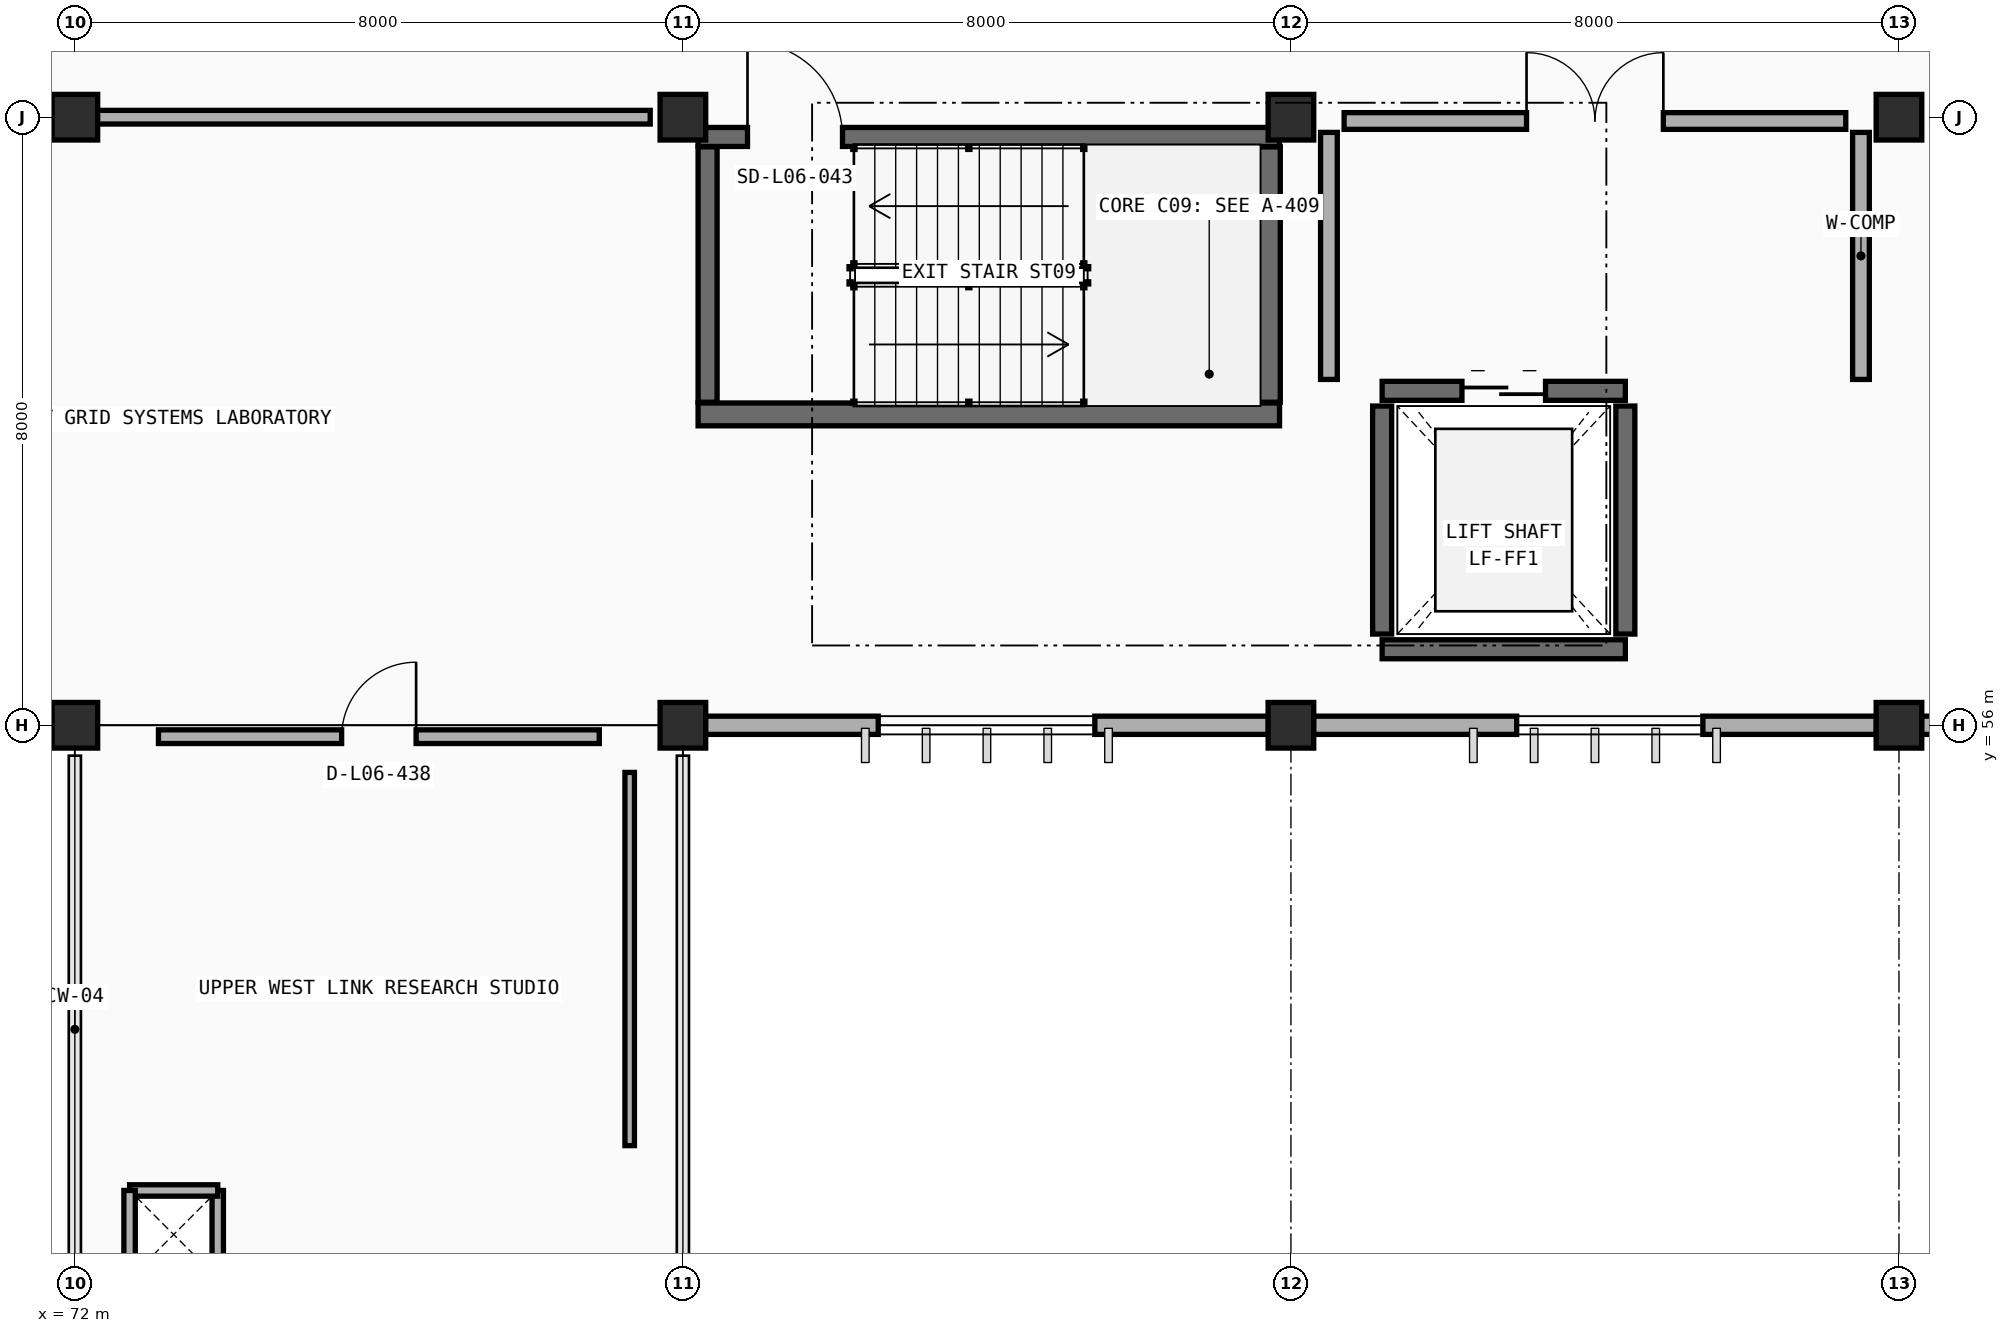
"""IFC4 building model, lengths in metres.
Left out: names, types, materials, properties, quantities, classifications, styles, units other than length and angle.
Written with IfcOpenShell. Run it as: python <this file> out.ifc"""

import sys

from ifc_helpers import new_model, si_unit, direction, frame, frame_2d, origin, origin_2d, place, context, subcontext, project, spatial, rectangle, extrude, element, fill, save


model = new_model("IFC4")
c1 = context("Model", 3, precision=1e-05, world=origin(), true_north=direction((0.0, 1.0)))
c2 = subcontext(c1, "Body", "Model", "MODEL_VIEW")
j1 = project(units=[si_unit("LENGTHUNIT", "METRE"), si_unit("PLANEANGLEUNIT", "RADIAN")], contexts=[c1])
p1 = place(None, origin())
s1 = spatial("IfcSite", under=j1, at=p1, CompositionType="ELEMENT")
p2 = place(p1, origin())
s2 = spatial("IfcBuilding", under=s1, at=p2, CompositionType="ELEMENT")
p3 = place(p2, frame((0.0, 0.0, 22.2)))
s3 = spatial("IfcBuildingStorey", under=s2, at=p3, CompositionType="ELEMENT", Elevation=22.2)
for number, where, z_axis, x_axis in (
    (1, (72.0, 56.0, 0.0), (0.0, 0.0, 1.0), (1.0, 0.0, 0.0)),
    (2, (80.0, 56.0, 0.0), (0.0, 0.0, 1.0), (1.0, 0.0, 0.0)),
    (3, (88.0, 56.0, 0.0), (0.0, 0.0, 1.0), (1.0, 0.0, 0.0)),
    (4, (96.0, 56.0, 0.0), (0.0, 0.0, 1.0), (1.0, 0.0, 0.0)),
    (5, (72.0, 64.0, 0.0), (0.0, 0.0, 1.0), (1.0, 0.0, 0.0)),
    (6, (80.0, 64.0, 0.0), (0.0, 0.0, 1.0), (1.0, 0.0, 0.0)),
    (7, (88.0, 64.0, 0.0), (0.0, 0.0, 1.0), (1.0, 0.0, 0.0)),
    (8, (96.0, 64.0, 0.0), (0.0, 0.0, 1.0), (1.0, 0.0, 0.0)),
):
    element("IfcColumn", number, at=place(p3, frame(where, z_axis=z_axis, x_axis=x_axis)), inside=s3, PredefinedType="COLUMN", context=c2, shape_type="SweptSolid", body=[
        extrude(rectangle(XDim=0.6, YDim=0.6, at=origin_2d()), origin(), (0.0, 0.0, 1.0), 4.2),
    ])
p4 = place(p3, frame((71.703, 56.0, 0.0), z_axis=(0.0, 0.0, 1.0), x_axis=(-1.0, 0.0, 0.0)))
e9 = element("IfcWall", 9, at=p4, inside=s3, PredefinedType="STANDARD", context=c2, shape_type="SweptSolid", body=[
    extrude(rectangle(XDim=7.431, YDim=0.24, at=frame_2d((3.715, 0.0))), origin(), (0.0, 0.0, 1.0), 3.335),
])
p5 = place(p4, frame((2.283, 0.0, 0.9)))
e10 = element("IfcOpeningElement", 10, at=p5, cuts=e9, PredefinedType="OPENING", context=c2, shape_type="SweptSolid", body=[
    extrude(rectangle(XDim=2.45, YDim=2.0, at=frame_2d((1.225, 1.0))), frame((0.0, 0.13, 0.0), z_axis=(0.0, -1.0, 0.0), x_axis=(1.0, 0.0, 0.0)), (0.0, 0.0, 1.0), 0.26),
])
p6 = place(p3, frame((87.703, 56.0, 0.0), z_axis=(0.0, 0.0, 1.0), x_axis=(-1.0, 0.0, 0.0)))
e11 = element("IfcWall", 11, at=p6, inside=s3, PredefinedType="STANDARD", context=c2, shape_type="SweptSolid", body=[
    extrude(rectangle(XDim=7.406, YDim=0.24, at=frame_2d((3.703, 0.0))), origin(), (0.0, 0.0, 1.0), 3.335),
])
p7 = place(p6, frame((2.283, 0.0, 0.9)))
e12 = element("IfcOpeningElement", 12, at=p7, cuts=e11, PredefinedType="OPENING", context=c2, shape_type="SweptSolid", body=[
    extrude(rectangle(XDim=2.85, YDim=2.0, at=frame_2d((1.425, 1.0))), frame((0.0, 0.13, 0.0), z_axis=(0.0, -1.0, 0.0), x_axis=(1.0, 0.0, 0.0)), (0.0, 0.0, 1.0), 0.26),
])
p8 = place(p3, frame((95.703, 56.0, 0.0), z_axis=(0.0, 0.0, 1.0), x_axis=(-1.0, 0.0, 0.0)))
e13 = element("IfcWall", 13, at=p8, inside=s3, PredefinedType="STANDARD", context=c2, shape_type="SweptSolid", body=[
    extrude(rectangle(XDim=7.406, YDim=0.24, at=frame_2d((3.703, 0.0))), origin(), (0.0, 0.0, 1.0), 3.335),
])
p9 = place(p8, frame((2.283, 0.0, 0.9)))
e14 = element("IfcOpeningElement", 14, at=p9, cuts=e13, PredefinedType="OPENING", context=c2, shape_type="SweptSolid", body=[
    extrude(rectangle(XDim=2.45, YDim=2.0, at=frame_2d((1.225, 1.0))), frame((0.0, 0.13, 0.0), z_axis=(0.0, -1.0, 0.0), x_axis=(1.0, 0.0, 0.0)), (0.0, 0.0, 1.0), 0.26),
])
p10 = place(p3, frame((103.703, 56.0, 0.0), z_axis=(0.0, 0.0, 1.0), x_axis=(-1.0, 0.0, 0.0)))
e15 = element("IfcWall", 15, at=p10, inside=s3, PredefinedType="STANDARD", context=c2, shape_type="SweptSolid", body=[
    extrude(rectangle(XDim=7.406, YDim=0.24, at=frame_2d((3.703, 0.0))), origin(), (0.0, 0.0, 1.0), 3.335),
])
p11 = place(p10, frame((2.283, 0.0, 0.9)))
e16 = element("IfcOpeningElement", 16, at=p11, cuts=e15, PredefinedType="OPENING", context=c2, shape_type="SweptSolid", body=[
    extrude(rectangle(XDim=2.65, YDim=2.0, at=frame_2d((1.325, 1.0))), frame((0.0, 0.13, 0.0), z_axis=(0.0, -1.0, 0.0), x_axis=(1.0, 0.0, 0.0)), (0.0, 0.0, 1.0), 0.26),
])
p12 = place(p3, frame((80.2, 60.09, 0.0), z_axis=(0.0, 0.0, 1.0), x_axis=(1.0, 0.0, 0.0)))
e17 = element("IfcWall", 17, at=p12, inside=s3, PredefinedType="SHEAR", context=c2, shape_type="SweptSolid", body=[
    extrude(rectangle(XDim=7.65, YDim=0.3, at=frame_2d((3.825, 0.0))), origin(), (0.0, 0.0, 1.0), 4.2),
])
p13 = place(p3, frame((87.71, 60.25, 0.0), z_axis=(0.0, 0.0, 1.0), x_axis=(0.0, 1.0, 0.0)))
e18 = element("IfcWall", 18, at=p13, inside=s3, PredefinedType="SHEAR", context=c2, shape_type="SweptSolid", body=[
    extrude(rectangle(XDim=3.36, YDim=0.3, at=frame_2d((1.68, 0.0))), origin(), (0.0, 0.0, 1.0), 4.2),
])
p14 = place(p3, frame((80.2, 63.74, 0.0), z_axis=(0.0, 0.0, 1.0), x_axis=(1.0, 0.0, 0.0)))
e19 = element("IfcWall", 19, at=p14, inside=s3, PredefinedType="SOLIDWALL", context=c2, shape_type="SweptSolid", body=[
    extrude(rectangle(XDim=7.65, YDim=0.25, at=frame_2d((3.825, 0.0))), origin(), (0.0, 0.0, 1.0), 4.2),
])
p15 = place(p14, frame((0.65, 0.0, 0.0)))
e20 = element("IfcOpeningElement", 20, at=p15, cuts=e19, PredefinedType="OPENING", context=c2, shape_type="SweptSolid", body=[
    extrude(rectangle(XDim=1.25, YDim=2.15, at=frame_2d((0.625, 1.075))), frame((0.0, 0.135, 0.0), z_axis=(0.0, -1.0, 0.0), x_axis=(1.0, 0.0, 0.0)), (0.0, 0.0, 1.0), 0.27),
])
p16 = place(p3, frame((80.325, 60.25, 0.0), z_axis=(0.0, 0.0, 1.0), x_axis=(0.0, 1.0, 0.0)))
e21 = element("IfcWall", 21, at=p16, inside=s3, PredefinedType="SOLIDWALL", context=c2, shape_type="SweptSolid", body=[
    extrude(rectangle(XDim=3.36, YDim=0.25, at=frame_2d((1.68, 0.0))), origin(), (0.0, 0.0, 1.0), 4.2),
])
p17 = place(p3, frame((89.2, 57.0, 0.0), z_axis=(0.0, 0.0, 1.0), x_axis=(1.0, 0.0, 0.0)))
e22 = element("IfcWall", 22, at=p17, inside=s3, PredefinedType="SOLIDWALL", context=c2, shape_type="SweptSolid", body=[
    extrude(rectangle(XDim=3.2, YDim=0.25, at=frame_2d((1.6, 0.0))), origin(), (0.0, 0.0, 1.0), 4.2),
])
p18 = place(p3, frame((89.2, 60.4, 0.0), z_axis=(0.0, 0.0, 1.0), x_axis=(1.0, 0.0, 0.0)))
e23 = element("IfcWall", 23, at=p18, inside=s3, PredefinedType="SOLIDWALL", context=c2, shape_type="SweptSolid", body=[
    extrude(rectangle(XDim=3.2, YDim=0.25, at=frame_2d((1.6, 0.0))), origin(), (0.0, 0.0, 1.0), 4.2),
])
p19 = place(p18, frame((1.05, 0.0, 0.0)))
e24 = element("IfcOpeningElement", 24, at=p19, cuts=e23, PredefinedType="OPENING", context=c2, shape_type="SweptSolid", body=[
    extrude(rectangle(XDim=1.1, YDim=2.15, at=frame_2d((0.55, 1.075))), frame((0.0, 0.135, 0.0), z_axis=(0.0, -1.0, 0.0), x_axis=(1.0, 0.0, 0.0)), (0.0, 0.0, 1.0), 0.27),
])
for number, where, z_axis, x_axis in (
    (25, (89.2, 57.2, 0.0), (0.0, 0.0, 1.0), (0.0, 1.0, 0.0)),
    (26, (92.4, 57.2, 0.0), (0.0, 0.0, 1.0), (0.0, 1.0, 0.0)),
):
    element("IfcWall", number, at=place(p3, frame(where, z_axis=z_axis, x_axis=x_axis)), inside=s3, PredefinedType="SOLIDWALL", context=c2, shape_type="SweptSolid", body=[
        extrude(rectangle(XDim=3.0, YDim=0.25, at=frame_2d((1.5, 0.0))), origin(), (0.0, 0.0, 1.0), 4.2),
    ])
p20 = place(p3, frame((88.7, 63.95, 0.0), z_axis=(0.0, 0.0, 1.0), x_axis=(1.0, 0.0, 0.0)))
e27 = element("IfcWall", 27, at=p20, inside=s3, PredefinedType="PARTITIONING", context=c2, shape_type="SweptSolid", body=[
    extrude(rectangle(XDim=6.6, YDim=0.22, at=frame_2d((3.3, 0.0))), origin(), (0.0, 0.0, 1.0), 3.3),
])
p21 = place(p20, frame((2.4, 0.0, 0.0)))
e28 = element("IfcOpeningElement", 28, at=p21, cuts=e27, PredefinedType="OPENING", context=c2, shape_type="SweptSolid", body=[
    extrude(rectangle(XDim=1.8, YDim=2.2, at=frame_2d((0.9, 1.1))), frame((0.0, 0.12, 0.0), z_axis=(0.0, -1.0, 0.0), x_axis=(1.0, 0.0, 0.0)), (0.0, 0.0, 1.0), 0.24),
])
for number, where, z_axis, x_axis in (
    (29, (88.5, 60.55, 0.0), (0.0, 0.0, 1.0), (0.0, 1.0, 0.0)),
    (30, (95.5, 60.55, 0.0), (0.0, 0.0, 1.0), (0.0, 1.0, 0.0)),
):
    element("IfcWall", number, at=place(p3, frame(where, z_axis=z_axis, x_axis=x_axis)), inside=s3, PredefinedType="PARTITIONING", context=c2, shape_type="SweptSolid", body=[
        extrude(rectangle(XDim=3.25, YDim=0.22, at=frame_2d((1.625, 0.0))), origin(), (0.0, 0.0, 1.0), 3.3),
    ])
for number, where, z_axis, x_axis in (
    (31, (73.88, 48.72, 0.0), (0.0, 0.0, 1.0), (0.0, 1.0, 0.0)),
    (32, (73.88, 49.88, 0.0), (0.0, 0.0, 1.0), (-1.0, 0.0, 0.0)),
    (33, (72.72, 49.88, 0.0), (0.0, 0.0, 1.0), (0.0, -1.0, 0.0)),
):
    element("IfcWall", number, at=place(p3, frame(where, z_axis=z_axis, x_axis=x_axis)), inside=s3, PredefinedType="PARTITIONING", context=c2, shape_type="SweptSolid", body=[
        extrude(rectangle(XDim=1.16, YDim=0.15, at=frame_2d((0.58, 0.0))), origin(), (0.0, 0.0, 1.0), 3.9),
    ])
p22 = place(p3, frame((64.43, 64.0, 0.0), z_axis=(0.0, 0.0, 1.0), x_axis=(1.0, 0.0, 0.0)))
e34 = element("IfcWall", 34, at=p22, inside=s3, PredefinedType="PARTITIONING", context=c2, shape_type="SweptSolid", body=[
    extrude(rectangle(XDim=15.14, YDim=0.18, at=frame_2d((7.57, 0.0))), origin(), (0.0, 0.0, 1.0), 3.3),
])
p23 = place(p22, frame((2.995, 0.0, 0.0)))
e35 = element("IfcOpeningElement", 35, at=p23, cuts=e34, PredefinedType="OPENING", context=c2, shape_type="SweptSolid", body=[
    extrude(rectangle(XDim=1.15, YDim=2.15, at=frame_2d((0.575, 1.075))), frame((0.0, 0.1, 0.0), z_axis=(0.0, -1.0, 0.0), x_axis=(1.0, 0.0, 0.0)), (0.0, 0.0, 1.0), 0.2),
])
p24 = place(p3, frame((73.1, 55.85, 0.0), z_axis=(0.0, 0.0, 1.0), x_axis=(1.0, 0.0, 0.0)))
e36 = element("IfcWall", 36, at=p24, inside=s3, PredefinedType="PARTITIONING", context=c2, shape_type="SweptSolid", body=[
    extrude(rectangle(XDim=5.8, YDim=0.18, at=frame_2d((2.9, 0.0))), origin(), (0.0, 0.0, 1.0), 3.3),
])
p25 = place(p24, frame((2.41, 0.0, 0.0)))
e37 = element("IfcOpeningElement", 37, at=p25, cuts=e36, PredefinedType="OPENING", context=c2, shape_type="SweptSolid", body=[
    extrude(rectangle(XDim=0.98, YDim=2.1, at=frame_2d((0.49, 1.05))), frame((0.0, 0.1, 0.0), z_axis=(0.0, -1.0, 0.0), x_axis=(1.0, 0.0, 0.0)), (0.0, 0.0, 1.0), 0.2),
])
p26 = place(p3, frame((79.3, 50.47, 0.0), z_axis=(0.0, 0.0, 1.0), x_axis=(0.0, 1.0, 0.0)))
e38 = element("IfcWall", 38, at=p26, inside=s3, PredefinedType="PARTITIONING", context=c2, shape_type="SweptSolid", body=[
    extrude(rectangle(XDim=4.91, YDim=0.125, at=frame_2d((2.455, 0.0))), origin(), (0.0, 0.0, 1.0), 3.3),
])
p27 = place(p7, origin())
e39 = element("IfcWindow", 39, at=p27, inside=s3, PartitioningType="DOUBLE_PANEL_VERTICAL", PredefinedType="WINDOW", context=c2, shape_type="SweptSolid", body=[
    extrude(rectangle(XDim=2.85, YDim=2.0, at=frame_2d((1.425, 1.0))), frame((0.0, 0.03, 0.0), z_axis=(0.0, -1.0, 0.0), x_axis=(1.0, 0.0, 0.0)), (0.0, 0.0, 1.0), 0.06),
])
fill(e12, e39)
p28 = place(p9, origin())
e40 = element("IfcWindow", 40, at=p28, inside=s3, PartitioningType="DOUBLE_PANEL_VERTICAL", PredefinedType="WINDOW", context=c2, shape_type="SweptSolid", body=[
    extrude(rectangle(XDim=2.45, YDim=2.0, at=frame_2d((1.225, 1.0))), frame((0.0, 0.03, 0.0), z_axis=(0.0, -1.0, 0.0), x_axis=(1.0, 0.0, 0.0)), (0.0, 0.0, 1.0), 0.06),
])
fill(e14, e40)
p29 = place(p15, origin())
e41 = element("IfcDoor", 41, at=p29, inside=s3, OperationType="SINGLE_SWING_LEFT", PredefinedType="DOOR", context=c2, shape_type="SweptSolid", body=[
    extrude(rectangle(XDim=1.25, YDim=2.15, at=frame_2d((0.625, 1.075))), frame((0.0, 0.025, 0.0), z_axis=(0.0, -1.0, 0.0), x_axis=(1.0, 0.0, 0.0)), (0.0, 0.0, 1.0), 0.05),
])
fill(e20, e41)
p30 = place(p19, origin())
e42 = element("IfcDoor", 42, at=p30, inside=s3, OperationType="DOUBLE_DOOR_SLIDING", PredefinedType="DOOR", context=c2, shape_type="SweptSolid", body=[
    extrude(rectangle(XDim=1.1, YDim=2.15, at=frame_2d((0.55, 1.075))), frame((0.0, 0.025, 0.0), z_axis=(0.0, -1.0, 0.0), x_axis=(1.0, 0.0, 0.0)), (0.0, 0.0, 1.0), 0.05),
])
fill(e24, e42)
p31 = place(p21, origin())
e43 = element("IfcDoor", 43, at=p31, inside=s3, OperationType="DOUBLE_DOOR_SINGLE_SWING", PredefinedType="DOOR", context=c2, shape_type="SweptSolid", body=[
    extrude(rectangle(XDim=1.8, YDim=2.2, at=frame_2d((0.9, 1.1))), frame((0.0, 0.025, 0.0), z_axis=(0.0, -1.0, 0.0), x_axis=(1.0, 0.0, 0.0)), (0.0, 0.0, 1.0), 0.05),
])
fill(e28, e43)
p32 = place(p25, origin())
e44 = element("IfcDoor", 44, at=p32, inside=s3, OperationType="SINGLE_SWING_RIGHT", PredefinedType="DOOR", context=c2, shape_type="SweptSolid", body=[
    extrude(rectangle(XDim=0.98, YDim=2.1, at=frame_2d((0.49, 1.05))), frame((0.0, 0.025, 0.0), z_axis=(0.0, -1.0, 0.0), x_axis=(1.0, 0.0, 0.0)), (0.0, 0.0, 1.0), 0.05),
])
fill(e37, e44)
save(model, sys.argv[1])
